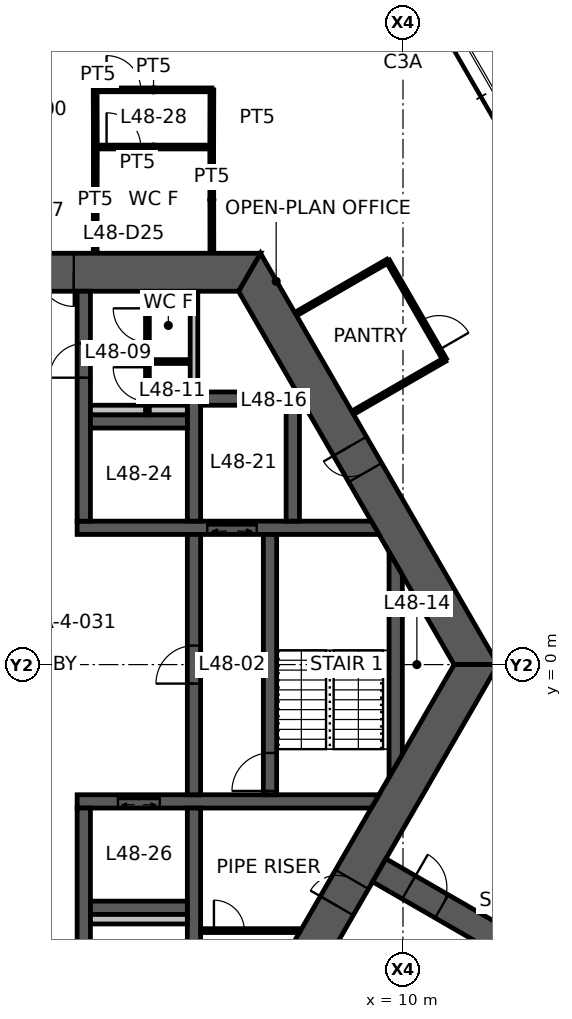
"""IFC4 building model, lengths in metres.
Left out: names, types, materials, properties, quantities, classifications, styles, units other than length and angle.
Written with IfcOpenShell. Run it as: python <this file> out.ifc"""

import sys

from ifc_helpers import new_model, si_unit, direction, frame, frame_2d, origin, place, context, subcontext, project, spatial, polyline, rectangle, outline, extrude, element, fill, save


model = new_model("IFC4")
c1 = context("Model", 3, precision=1e-05, world=origin(), true_north=direction((0.0, 1.0)))
c2 = subcontext(c1, "Body", "Model", "MODEL_VIEW")
j1 = project(units=[si_unit("LENGTHUNIT", "METRE"), si_unit("PLANEANGLEUNIT", "RADIAN")], contexts=[c1])
p1 = place(None, origin())
s1 = spatial("IfcSite", under=j1, at=p1, CompositionType="ELEMENT")
p2 = place(p1, origin())
s2 = spatial("IfcBuilding", under=s1, at=p2, CompositionType="ELEMENT")
p3 = place(p2, frame((0.0, 0.0, 191.6)))
s3 = spatial("IfcBuildingStorey", under=s2, at=p3, CompositionType="ELEMENT", Elevation=191.6)
p4 = place(p3, frame((11.922, 0.0, 0.0), z_axis=(0.0, 0.0, 1.0), x_axis=(-0.500004296715, 0.866022923061, 0.0)))
e1 = element("IfcWall", 1, at=p4, inside=s3, PredefinedType="SHEAR", context=c2, shape_type="SweptSolid", body=[
    extrude(outline(polyline([(-0.289, -0.5), (5.835, -0.5), (6.635, -0.5), (12.211, -0.5), (11.634, 0.5), (6.635, 0.5), (5.835, 0.5), (0.289, 0.5), (-0.289, -0.5)])), origin(), (0.0, 0.0, 1.0), 3.9),
])
p5 = place(p4, frame((5.835, 0.0, 0.0)))
e2 = element("IfcOpeningElement", 2, at=p5, cuts=e1, PredefinedType="OPENING", context=c2, shape_type="SweptSolid", body=[
    extrude(rectangle(XDim=0.8, YDim=2.1, at=frame_2d((0.4, 1.05))), frame((0.0, 0.51, 0.0), z_axis=(0.0, -1.0, 0.0), x_axis=(1.0, 0.0, 0.0)), (0.0, 0.0, 1.0), 1.02),
])
p6 = place(p3, frame((5.961, 10.325, 0.0), z_axis=(0.0, 0.0, 1.0), x_axis=(-1.0, 0.0, 0.0)))
e3 = element("IfcWall", 3, at=p6, inside=s3, PredefinedType="SHEAR", context=c2, shape_type="SweptSolid", body=[
    extrude(outline(polyline([(-0.289, -0.5), (4.624, -0.5), (5.523, -0.5), (6.399, -0.5), (7.299, -0.5), (12.211, -0.5), (11.634, 0.5), (7.299, 0.5), (6.399, 0.5), (5.523, 0.5), (4.624, 0.5), (0.289, 0.5), (-0.289, -0.5)])), origin(), (0.0, 0.0, 1.0), 3.9),
])
p7 = place(p6, frame((6.399, 0.0, 0.0)))
e4 = element("IfcOpeningElement", 4, at=p7, cuts=e3, PredefinedType="OPENING", context=c2, shape_type="SweptSolid", body=[
    extrude(rectangle(XDim=0.9, YDim=2.1, at=frame_2d((0.45, 1.05))), frame((0.0, 0.51, 0.0), z_axis=(0.0, -1.0, 0.0), x_axis=(1.0, 0.0, 0.0)), (0.0, 0.0, 1.0), 1.02),
])
p8 = place(p6, frame((4.624, 0.0, 0.0)))
e5 = element("IfcOpeningElement", 5, at=p8, cuts=e3, PredefinedType="OPENING", context=c2, shape_type="SweptSolid", body=[
    extrude(rectangle(XDim=0.9, YDim=2.1, at=frame_2d((0.45, 1.05))), frame((0.0, 0.51, 0.0), z_axis=(0.0, -1.0, 0.0), x_axis=(1.0, 0.0, 0.0)), (0.0, 0.0, 1.0), 1.02),
])
p9 = place(p3, frame((5.961, -10.325, 0.0), z_axis=(0.0, 0.0, 1.0), x_axis=(0.500004296715, 0.866022923061, 0.0)))
e6 = element("IfcWall", 6, at=p9, inside=s3, PredefinedType="SHEAR", context=c2, shape_type="SweptSolid", body=[
    extrude(outline(polyline([(-0.289, -0.5), (4.594, -0.5), (5.394, -0.5), (12.211, -0.5), (11.634, 0.5), (5.394, 0.5), (4.594, 0.5), (0.289, 0.5), (-0.289, -0.5)])), origin(), (0.0, 0.0, 1.0), 3.9),
])
p10 = place(p9, frame((4.594, 0.0, 0.0)))
e7 = element("IfcOpeningElement", 7, at=p10, cuts=e6, PredefinedType="OPENING", context=c2, shape_type="SweptSolid", body=[
    extrude(rectangle(XDim=0.8, YDim=2.1, at=frame_2d((0.4, 1.05))), frame((0.0, 0.51, 0.0), z_axis=(0.0, -1.0, 0.0), x_axis=(1.0, 0.0, 0.0)), (0.0, 0.0, 1.0), 1.02),
])
p11 = place(p3, frame((9.375, -5.413, 0.0), z_axis=(0.0, 0.0, 1.0), x_axis=(0.866032377459, -0.499987921047, 0.0)))
e8 = element("IfcWall", 8, at=p11, inside=s3, PredefinedType="SHEAR", context=c2, shape_type="SweptSolid", body=[
    extrude(rectangle(XDim=7.696, YDim=0.7, at=frame_2d((3.848, 0.0))), origin(), (0.0, 0.0, 1.0), 3.9),
])
p12 = place(p11, frame((0.9, 0.0, 0.0)))
e9 = element("IfcOpeningElement", 9, at=p12, cuts=e8, PredefinedType="OPENING", context=c2, shape_type="SweptSolid", body=[
    extrude(rectangle(XDim=1.0, YDim=2.1, at=frame_2d((0.5, 1.05))), frame((0.0, 0.36, 0.0), z_axis=(0.0, -1.0, 0.0), x_axis=(1.0, 0.0, 0.0)), (0.0, 0.0, 1.0), 0.72),
])
p13 = place(p3, frame((1.425, 3.6, 0.0), z_axis=(0.0, 0.0, 1.0), x_axis=(1.0, 0.0, 0.0)))
e10 = element("IfcWall", 10, at=p13, inside=s3, PredefinedType="SHEAR", context=c2, shape_type="SweptSolid", body=[
    extrude(outline(polyline([(0.0, -0.175), (3.425, -0.175), (4.725, -0.175), (7.942, -0.175), (7.74, 0.175), (4.725, 0.175), (3.425, 0.175), (0.0, 0.175), (0.0, -0.175)])), origin(), (0.0, 0.0, 1.0), 3.9),
])
p14 = place(p13, frame((3.425, 0.0, 0.0)))
e11 = element("IfcOpeningElement", 11, at=p14, cuts=e10, PredefinedType="OPENING", context=c2, shape_type="SweptSolid", body=[
    extrude(rectangle(XDim=1.3, YDim=2.1, at=frame_2d((0.65, 1.05))), frame((0.0, 0.185, 0.0), z_axis=(0.0, -1.0, 0.0), x_axis=(1.0, 0.0, 0.0)), (0.0, 0.0, 1.0), 0.37),
])
p15 = place(p3, frame((1.425, -3.6, 0.0), z_axis=(0.0, 0.0, 1.0), x_axis=(1.0, 0.0, 0.0)))
e12 = element("IfcWall", 12, at=p15, inside=s3, PredefinedType="SHEAR", context=c2, shape_type="SweptSolid", body=[
    extrude(outline(polyline([(0.0, -0.175), (1.075, -0.175), (2.175, -0.175), (7.74, -0.175), (7.942, 0.175), (2.175, 0.175), (1.075, 0.175), (0.0, 0.175), (0.0, -0.175)])), origin(), (0.0, 0.0, 1.0), 3.9),
])
p16 = place(p15, frame((1.075, 0.0, 0.0)))
e13 = element("IfcOpeningElement", 13, at=p16, cuts=e12, PredefinedType="OPENING", context=c2, shape_type="SweptSolid", body=[
    extrude(rectangle(XDim=1.1, YDim=2.1, at=frame_2d((0.55, 1.05))), frame((0.0, 0.185, 0.0), z_axis=(0.0, -1.0, 0.0), x_axis=(1.0, 0.0, 0.0)), (0.0, 0.0, 1.0), 0.37),
])
p17 = place(p3, frame((1.6, 3.775, 0.0), z_axis=(0.0, 0.0, 1.0), x_axis=(0.0, 1.0, 0.0)))
e14 = element("IfcWall", 14, at=p17, inside=s3, PredefinedType="SHEAR", context=c2, shape_type="SweptSolid", body=[
    extrude(rectangle(XDim=6.05, YDim=0.35, at=frame_2d((3.025, 0.0))), origin(), (0.0, 0.0, 1.0), 3.9),
])
p18 = place(p17, frame((3.775, 0.0, 0.0)))
e15 = element("IfcOpeningElement", 15, at=p18, cuts=e14, PredefinedType="OPENING", context=c2, shape_type="SweptSolid", body=[
    extrude(rectangle(XDim=0.9, YDim=2.1, at=frame_2d((0.45, 1.05))), frame((0.0, 0.185, 0.0), z_axis=(0.0, -1.0, 0.0), x_axis=(1.0, 0.0, 0.0)), (0.0, 0.0, 1.0), 0.37),
])
p19 = place(p3, frame((1.6, -3.775, 0.0), z_axis=(0.0, 0.0, 1.0), x_axis=(0.0, -1.0, 0.0)))
e16 = element("IfcWall", 16, at=p19, inside=s3, PredefinedType="SHEAR", context=c2, shape_type="SweptSolid", body=[
    extrude(rectangle(XDim=6.05, YDim=0.35, at=frame_2d((3.025, 0.0))), origin(), (0.0, 0.0, 1.0), 3.9),
])
p20 = place(p19, frame((3.625, 0.0, 0.0)))
e17 = element("IfcOpeningElement", 17, at=p20, cuts=e16, PredefinedType="OPENING", context=c2, shape_type="SweptSolid", body=[
    extrude(rectangle(XDim=1.2, YDim=2.1, at=frame_2d((0.6, 1.05))), frame((0.0, 0.185, 0.0), z_axis=(0.0, -1.0, 0.0), x_axis=(1.0, 0.0, 0.0)), (0.0, 0.0, 1.0), 0.37),
])
p21 = place(p3, frame((4.5, -3.425, 0.0), z_axis=(0.0, 0.0, 1.0), x_axis=(0.0, 1.0, 0.0)))
e18 = element("IfcWall", 18, at=p21, inside=s3, PredefinedType="SHEAR", context=c2, shape_type="SweptSolid", body=[
    extrude(rectangle(XDim=6.85, YDim=0.35, at=frame_2d((3.425, 0.0))), origin(), (0.0, 0.0, 1.0), 3.9),
])
p22 = place(p21, frame((2.925, 0.0, 0.0)))
e19 = element("IfcOpeningElement", 19, at=p22, cuts=e18, PredefinedType="OPENING", context=c2, shape_type="SweptSolid", body=[
    extrude(rectangle(XDim=1.0, YDim=2.1, at=frame_2d((0.5, 1.05))), frame((0.0, 0.185, 0.0), z_axis=(0.0, -1.0, 0.0), x_axis=(1.0, 0.0, 0.0)), (0.0, 0.0, 1.0), 0.37),
])
p23 = place(p3, frame((6.5, -3.425, 0.0), z_axis=(0.0, 0.0, 1.0), x_axis=(0.0, 1.0, 0.0)))
e20 = element("IfcWall", 20, at=p23, inside=s3, PredefinedType="SHEAR", context=c2, shape_type="SweptSolid", body=[
    extrude(rectangle(XDim=6.85, YDim=0.35, at=frame_2d((3.425, 0.0))), origin(), (0.0, 0.0, 1.0), 3.9),
])
p24 = place(p23, frame((0.1, 0.0, 0.0)))
e21 = element("IfcOpeningElement", 21, at=p24, cuts=e20, PredefinedType="OPENING", context=c2, shape_type="SweptSolid", body=[
    extrude(rectangle(XDim=1.0, YDim=2.1, at=frame_2d((0.5, 1.05))), frame((0.0, 0.185, 0.0), z_axis=(0.0, -1.0, 0.0), x_axis=(1.0, 0.0, 0.0)), (0.0, 0.0, 1.0), 0.37),
])
p25 = place(p3, frame((4.5, 3.775, 0.0), z_axis=(0.0, 0.0, 1.0), x_axis=(0.0, 1.0, 0.0)))
e22 = element("IfcWall", 22, at=p25, inside=s3, PredefinedType="SHEAR", context=c2, shape_type="SweptSolid", body=[
    extrude(rectangle(XDim=3.4, YDim=0.35, at=frame_2d((1.7, 0.0))), origin(), (0.0, 0.0, 1.0), 3.9),
])
p26 = place(p3, frame((4.5, -3.775, 0.0), z_axis=(0.0, 0.0, 1.0), x_axis=(0.0, -1.0, 0.0)))
e23 = element("IfcWall", 23, at=p26, inside=s3, PredefinedType="SHEAR", context=c2, shape_type="SweptSolid", body=[
    extrude(rectangle(XDim=6.05, YDim=0.35, at=frame_2d((3.025, 0.0))), origin(), (0.0, 0.0, 1.0), 3.9),
])
for number, where, z_axis, x_axis in (
    (24, (1.775, 6.4, 0.0), (0.0, 0.0, 1.0), (1.0, 0.0, 0.0)),
    (25, (1.775, -6.4, 0.0), (0.0, 0.0, 1.0), (1.0, 0.0, 0.0)),
):
    element("IfcWall", number, at=place(p3, frame(where, z_axis=z_axis, x_axis=x_axis)), inside=s3, PredefinedType="SHEAR", context=c2, shape_type="SweptSolid", body=[
        extrude(rectangle(XDim=2.55, YDim=0.35, at=frame_2d((1.275, 0.0))), origin(), (0.0, 0.0, 1.0), 3.9),
    ])
p27 = place(p3, frame((4.675, 7.0, 0.0), z_axis=(0.0, 0.0, 1.0), x_axis=(1.0, 0.0, 0.0)))
e26 = element("IfcWall", 26, at=p27, inside=s3, PredefinedType="SHEAR", context=c2, shape_type="SweptSolid", body=[
    extrude(rectangle(XDim=2.25, YDim=0.35, at=frame_2d((1.125, 0.0))), origin(), (0.0, 0.0, 1.0), 3.9),
])
p28 = place(p3, frame((7.1, 3.775, 0.0), z_axis=(0.0, 0.0, 1.0), x_axis=(0.0, 1.0, 0.0)))
e27 = element("IfcWall", 27, at=p28, inside=s3, PredefinedType="SHEAR", context=c2, shape_type="SweptSolid", body=[
    extrude(outline(polyline([(0.0, -0.175), (3.274, -0.175), (3.4, 0.0), (3.4, 0.175), (0.0, 0.175), (0.0, -0.175)])), origin(), (0.0, 0.0, 1.0), 3.9),
])
p29 = place(p3, frame((9.808, -2.662, 0.0), z_axis=(0.0, 0.0, 1.0), x_axis=(0.0, 1.0, 0.0)))
e28 = element("IfcWall", 28, at=p29, inside=s3, PredefinedType="SHEAR", context=c2, shape_type="SweptSolid", body=[
    extrude(outline(polyline([(0.303, -0.175), (5.021, -0.175), (5.628, 0.175), (-0.303, 0.175), (0.303, -0.175)])), origin(), (0.0, 0.0, 1.0), 3.9),
])
p30 = place(p3, frame((4.5, 7.175, 0.0), z_axis=(0.0, 0.0, 1.0), x_axis=(0.0, 1.0, 0.0)))
e29 = element("IfcWall", 29, at=p30, inside=s3, PredefinedType="STANDARD", context=c2, shape_type="SweptSolid", body=[
    extrude(rectangle(XDim=2.65, YDim=0.2, at=frame_2d((1.325, 0.0))), origin(), (0.0, 0.0, 1.0), 3.9),
])
for number, where, z_axis, x_axis in (
    (30, (1.775, 6.7, 0.0), (0.0, 0.0, 1.0), (1.0, 0.0, 0.0)),
    (31, (1.775, -6.7, 0.0), (0.0, 0.0, 1.0), (1.0, 0.0, 0.0)),
):
    element("IfcWall", number, at=place(p3, frame(where, z_axis=z_axis, x_axis=x_axis)), inside=s3, PredefinedType="PLUMBINGWALL", context=c2, shape_type="SweptSolid", body=[
        extrude(rectangle(XDim=2.55, YDim=0.25, at=frame_2d((1.275, 0.0))), origin(), (0.0, 0.0, 1.0), 3.9),
    ])
p31 = place(p3, frame((3.275, 6.575, 0.0), z_axis=(0.0, 0.0, 1.0), x_axis=(0.0, 1.0, 0.0)))
e32 = element("IfcWall", 32, at=p31, inside=s3, PredefinedType="PARTITIONING", context=c2, shape_type="SweptSolid", body=[
    extrude(rectangle(XDim=3.25, YDim=0.1, at=frame_2d((1.625, 0.0))), origin(), (0.0, 0.0, 1.0), 2.95),
])
p32 = place(p31, frame((1.9, 0.0, 0.0)))
e33 = element("IfcOpeningElement", 33, at=p32, cuts=e32, PredefinedType="OPENING", context=c2, shape_type="SweptSolid", body=[
    extrude(rectangle(XDim=0.9, YDim=2.1, at=frame_2d((0.45, 1.05))), frame((0.0, 0.06, 0.0), z_axis=(0.0, -1.0, 0.0), x_axis=(1.0, 0.0, 0.0)), (0.0, 0.0, 1.0), 0.12),
])
p33 = place(p31, frame((0.35, 0.0, 0.0)))
e34 = element("IfcOpeningElement", 34, at=p33, cuts=e32, PredefinedType="OPENING", context=c2, shape_type="SweptSolid", body=[
    extrude(rectangle(XDim=0.9, YDim=2.1, at=frame_2d((0.45, 1.05))), frame((0.0, 0.06, 0.0), z_axis=(0.0, -1.0, 0.0), x_axis=(1.0, 0.0, 0.0)), (0.0, 0.0, 1.0), 0.12),
])
p34 = place(p3, frame((3.325, 7.975, 0.0), z_axis=(0.0, 0.0, 1.0), x_axis=(1.0, 0.0, 0.0)))
e35 = element("IfcWall", 35, at=p34, inside=s3, PredefinedType="PARTITIONING", context=c2, shape_type="SweptSolid", body=[
    extrude(rectangle(XDim=1.0, YDim=0.1, at=frame_2d((0.5, 0.0))), origin(), (0.0, 0.0, 1.0), 2.95),
])
p35 = place(p3, frame((4.675, -7.0, 0.0), z_axis=(0.0, 0.0, 1.0), x_axis=(1.0, 0.0, 0.0)))
e36 = element("IfcWall", 36, at=p35, inside=s3, PredefinedType="PARTITIONING", context=c2, shape_type="SweptSolid", body=[
    extrude(outline(polyline([(0.0, -0.05), (0.35, -0.05), (1.15, -0.05), (2.6, -0.05), (2.628, 0.0), (2.634, 0.05), (1.15, 0.05), (0.35, 0.05), (0.0, 0.05), (0.0, -0.05)])), origin(), (0.0, 0.0, 1.0), 2.95),
])
p36 = place(p35, frame((0.35, 0.0, 0.0)))
e37 = element("IfcOpeningElement", 37, at=p36, cuts=e36, PredefinedType="OPENING", context=c2, shape_type="SweptSolid", body=[
    extrude(rectangle(XDim=0.8, YDim=2.1, at=frame_2d((0.4, 1.05))), frame((0.0, 0.06, 0.0), z_axis=(0.0, -1.0, 0.0), x_axis=(1.0, 0.0, 0.0)), (0.0, 0.0, 1.0), 0.12),
])
p37 = place(p3, frame((1.9, 13.62, 0.0), z_axis=(0.0, 0.0, 1.0), x_axis=(1.0, 0.0, 0.0)))
e38 = element("IfcWall", 38, at=p37, inside=s3, PredefinedType="PARTITIONING", context=c2, shape_type="SweptSolid", body=[
    extrude(rectangle(XDim=3.071, YDim=0.1, at=frame_2d((1.536, 0.0))), origin(), (0.0, 0.0, 1.0), 2.95),
])
p38 = place(p37, frame((0.3, 0.0, 0.0)))
e39 = element("IfcOpeningElement", 39, at=p38, cuts=e38, PredefinedType="OPENING", context=c2, shape_type="SweptSolid", body=[
    extrude(rectangle(XDim=0.9, YDim=2.1, at=frame_2d((0.45, 1.05))), frame((0.0, 0.06, 0.0), z_axis=(0.0, -1.0, 0.0), x_axis=(1.0, 0.0, 0.0)), (0.0, 0.0, 1.0), 0.12),
])
for number, where, z_axis, x_axis in (
    (40, (1.9, 10.845, 0.0), (0.0, 0.0, 1.0), (0.002, 1.0, 0.0)),
    (41, (4.966, 13.625, 0.0), (0.0, 0.0, 1.0), (0.002, -1.0, 0.0)),
):
    element("IfcWall", number, at=place(p3, frame(where, z_axis=z_axis, x_axis=x_axis)), inside=s3, PredefinedType="PARTITIONING", context=c2, shape_type="SweptSolid", body=[
        extrude(rectangle(XDim=2.78, YDim=0.1, at=frame_2d((1.39, 0.0))), origin(), (0.0, 0.0, 1.0), 2.95),
    ])
p39 = place(p3, frame((1.9, 15.125, 0.0), z_axis=(0.0, 0.0, 1.0), x_axis=(1.0, 0.0, 0.0)))
e42 = element("IfcWall", 42, at=p39, inside=s3, PredefinedType="PARTITIONING", context=c2, shape_type="SweptSolid", body=[
    extrude(rectangle(XDim=3.071, YDim=0.1, at=frame_2d((1.536, 0.0))), origin(), (0.0, 0.0, 1.0), 2.95),
])
p40 = place(p39, frame((0.3, 0.0, 0.0)))
e43 = element("IfcOpeningElement", 43, at=p40, cuts=e42, PredefinedType="OPENING", context=c2, shape_type="SweptSolid", body=[
    extrude(rectangle(XDim=0.9, YDim=2.1, at=frame_2d((0.45, 1.05))), frame((0.0, 0.06, 0.0), z_axis=(0.0, -1.0, 0.0), x_axis=(1.0, 0.0, 0.0)), (0.0, 0.0, 1.0), 0.12),
])
for number, where, z_axis, x_axis in (
    (44, (1.905, 13.625, 0.0), (0.0, 0.0, 1.0), (-0.003, 1.0, 0.0)),
    (45, (4.971, 15.125, 0.0), (0.0, 0.0, 1.0), (-0.003, -1.0, 0.0)),
):
    element("IfcWall", number, at=place(p3, frame(where, z_axis=z_axis, x_axis=x_axis)), inside=s3, PredefinedType="PARTITIONING", context=c2, shape_type="SweptSolid", body=[
        extrude(rectangle(XDim=1.5, YDim=0.1, at=frame_2d((0.75, 0.0))), origin(), (0.0, 0.0, 1.0), 2.95),
    ])
p41 = place(p3, frame((7.192, 9.233, 0.0), z_axis=(0.0, 0.0, 1.0), x_axis=(0.866018876994, 0.500011304563, 0.0)))
e46 = element("IfcWall", 46, at=p41, inside=s3, PredefinedType="PARTITIONING", context=c2, shape_type="SweptSolid", body=[
    extrude(rectangle(XDim=2.78, YDim=0.1, at=frame_2d((1.39, 0.0))), origin(), (0.0, 0.0, 1.0), 2.95),
])
p42 = place(p3, frame((9.6, 10.623, 0.0), z_axis=(0.0, 0.0, 1.0), x_axis=(0.499990139034, -0.866031096941, 0.0)))
e47 = element("IfcWall", 47, at=p42, inside=s3, PredefinedType="PARTITIONING", context=c2, shape_type="SweptSolid", body=[
    extrude(rectangle(XDim=3.0, YDim=0.1, at=frame_2d((1.5, 0.0))), origin(), (0.0, 0.0, 1.0), 2.95),
])
p43 = place(p42, frame((1.8, 0.0, 0.0)))
e48 = element("IfcOpeningElement", 48, at=p43, cuts=e47, PredefinedType="OPENING", context=c2, shape_type="SweptSolid", body=[
    extrude(rectangle(XDim=0.9, YDim=2.1, at=frame_2d((0.45, 1.05))), frame((0.0, 0.06, 0.0), z_axis=(0.0, -1.0, 0.0), x_axis=(1.0, 0.0, 0.0)), (0.0, 0.0, 1.0), 0.12),
])
p44 = place(p3, frame((11.1, 8.025, 0.0), z_axis=(0.0, 0.0, 1.0), x_axis=(-0.866056901187, -0.49994544093, 0.0)))
e49 = element("IfcWall", 49, at=p44, inside=s3, PredefinedType="PARTITIONING", context=c2, shape_type="SweptSolid", body=[
    extrude(rectangle(XDim=2.78, YDim=0.1, at=frame_2d((1.39, 0.0))), origin(), (0.0, 0.0, 1.0), 2.95),
])
p45 = place(p8, origin())
e50 = element("IfcDoor", 50, at=p45, inside=s3, OperationType="SINGLE_SWING_LEFT", PredefinedType="DOOR", context=c2, shape_type="SweptSolid", body=[
    extrude(rectangle(XDim=0.9, YDim=2.1, at=frame_2d((0.45, 1.05))), frame((0.0, 0.025, 0.0), z_axis=(0.0, -1.0, 0.0), x_axis=(1.0, 0.0, 0.0)), (0.0, 0.0, 1.0), 0.05),
])
fill(e5, e50)
p46 = place(p5, origin())
e51 = element("IfcDoor", 51, at=p46, inside=s3, OperationType="SINGLE_SWING_RIGHT", PredefinedType="DOOR", context=c2, shape_type="SweptSolid", body=[
    extrude(rectangle(XDim=0.8, YDim=2.1, at=frame_2d((0.4, 1.05))), frame((0.0, 0.025, 0.0), z_axis=(0.0, -1.0, 0.0), x_axis=(1.0, 0.0, 0.0)), (0.0, 0.0, 1.0), 0.05),
])
fill(e2, e51)
p47 = place(p10, origin())
e52 = element("IfcDoor", 52, at=p47, inside=s3, OperationType="SINGLE_SWING_LEFT", PredefinedType="DOOR", context=c2, shape_type="SweptSolid", body=[
    extrude(rectangle(XDim=0.8, YDim=2.1, at=frame_2d((0.4, 1.05))), frame((0.0, 0.025, 0.0), z_axis=(0.0, -1.0, 0.0), x_axis=(1.0, 0.0, 0.0)), (0.0, 0.0, 1.0), 0.05),
])
fill(e7, e52)
p48 = place(p22, origin())
e53 = element("IfcDoor", 53, at=p48, inside=s3, OperationType="SINGLE_SWING_LEFT", PredefinedType="DOOR", context=c2, shape_type="SweptSolid", body=[
    extrude(rectangle(XDim=1.0, YDim=2.1, at=frame_2d((0.5, 1.05))), frame((0.0, 0.025, 0.0), z_axis=(0.0, -1.0, 0.0), x_axis=(1.0, 0.0, 0.0)), (0.0, 0.0, 1.0), 0.05),
])
fill(e19, e53)
p49 = place(p24, origin())
e54 = element("IfcDoor", 54, at=p49, inside=s3, OperationType="SINGLE_SWING_LEFT", PredefinedType="DOOR", context=c2, shape_type="SweptSolid", body=[
    extrude(rectangle(XDim=1.0, YDim=2.1, at=frame_2d((0.5, 1.05))), frame((0.0, 0.025, 0.0), z_axis=(0.0, -1.0, 0.0), x_axis=(1.0, 0.0, 0.0)), (0.0, 0.0, 1.0), 0.05),
])
fill(e21, e54)
p50 = place(p18, origin())
e55 = element("IfcDoor", 55, at=p50, inside=s3, OperationType="SINGLE_SWING_LEFT", PredefinedType="DOOR", context=c2, shape_type="SweptSolid", body=[
    extrude(rectangle(XDim=0.9, YDim=2.1, at=frame_2d((0.45, 1.05))), frame((0.0, 0.025, 0.0), z_axis=(0.0, -1.0, 0.0), x_axis=(1.0, 0.0, 0.0)), (0.0, 0.0, 1.0), 0.05),
])
fill(e15, e55)
p51 = place(p12, origin())
e56 = element("IfcDoor", 56, at=p51, inside=s3, OperationType="SINGLE_SWING_LEFT", PredefinedType="DOOR", context=c2, shape_type="SweptSolid", body=[
    extrude(rectangle(XDim=1.0, YDim=2.1, at=frame_2d((0.5, 1.05))), frame((0.0, 0.025, 0.0), z_axis=(0.0, -1.0, 0.0), x_axis=(1.0, 0.0, 0.0)), (0.0, 0.0, 1.0), 0.05),
])
fill(e9, e56)
p52 = place(p32, origin())
e57 = element("IfcDoor", 57, at=p52, inside=s3, OperationType="SINGLE_SWING_RIGHT", PredefinedType="DOOR", context=c2, shape_type="SweptSolid", body=[
    extrude(rectangle(XDim=0.9, YDim=2.1, at=frame_2d((0.45, 1.05))), frame((0.0, 0.025, 0.0), z_axis=(0.0, -1.0, 0.0), x_axis=(1.0, 0.0, 0.0)), (0.0, 0.0, 1.0), 0.05),
])
fill(e33, e57)
p53 = place(p33, origin())
e58 = element("IfcDoor", 58, at=p53, inside=s3, OperationType="SINGLE_SWING_RIGHT", PredefinedType="DOOR", context=c2, shape_type="SweptSolid", body=[
    extrude(rectangle(XDim=0.9, YDim=2.1, at=frame_2d((0.45, 1.05))), frame((0.0, 0.025, 0.0), z_axis=(0.0, -1.0, 0.0), x_axis=(1.0, 0.0, 0.0)), (0.0, 0.0, 1.0), 0.05),
])
fill(e34, e58)
p54 = place(p36, origin())
e59 = element("IfcDoor", 59, at=p54, inside=s3, OperationType="SINGLE_SWING_LEFT", PredefinedType="DOOR", context=c2, shape_type="SweptSolid", body=[
    extrude(rectangle(XDim=0.8, YDim=2.1, at=frame_2d((0.4, 1.05))), frame((0.0, 0.025, 0.0), z_axis=(0.0, -1.0, 0.0), x_axis=(1.0, 0.0, 0.0)), (0.0, 0.0, 1.0), 0.05),
])
fill(e37, e59)
p55 = place(p38, origin())
e60 = element("IfcDoor", 60, at=p55, inside=s3, OperationType="SINGLE_SWING_LEFT", PredefinedType="DOOR", context=c2, shape_type="SweptSolid", body=[
    extrude(rectangle(XDim=0.9, YDim=2.1, at=frame_2d((0.45, 1.05))), frame((0.0, 0.025, 0.0), z_axis=(0.0, -1.0, 0.0), x_axis=(1.0, 0.0, 0.0)), (0.0, 0.0, 1.0), 0.05),
])
fill(e39, e60)
p56 = place(p40, origin())
e61 = element("IfcDoor", 61, at=p56, inside=s3, OperationType="SINGLE_SWING_LEFT", PredefinedType="DOOR", context=c2, shape_type="SweptSolid", body=[
    extrude(rectangle(XDim=0.9, YDim=2.1, at=frame_2d((0.45, 1.05))), frame((0.0, 0.025, 0.0), z_axis=(0.0, -1.0, 0.0), x_axis=(1.0, 0.0, 0.0)), (0.0, 0.0, 1.0), 0.05),
])
fill(e43, e61)
p57 = place(p43, origin())
e62 = element("IfcDoor", 62, at=p57, inside=s3, OperationType="SINGLE_SWING_RIGHT", PredefinedType="DOOR", context=c2, shape_type="SweptSolid", body=[
    extrude(rectangle(XDim=0.9, YDim=2.1, at=frame_2d((0.45, 1.05))), frame((0.0, 0.025, 0.0), z_axis=(0.0, -1.0, 0.0), x_axis=(1.0, 0.0, 0.0)), (0.0, 0.0, 1.0), 0.05),
])
fill(e48, e62)
p58 = place(p16, origin())
e63 = element("IfcDoor", 63, at=p58, inside=s3, OperationType="DOUBLE_DOOR_SLIDING", PredefinedType="DOOR", context=c2, shape_type="SweptSolid", body=[
    extrude(rectangle(XDim=1.1, YDim=2.1, at=frame_2d((0.55, 1.05))), frame((0.0, 0.025, 0.0), z_axis=(0.0, -1.0, 0.0), x_axis=(1.0, 0.0, 0.0)), (0.0, 0.0, 1.0), 0.05),
])
fill(e13, e63)
p59 = place(p14, origin())
e64 = element("IfcDoor", 64, at=p59, inside=s3, OperationType="DOUBLE_DOOR_SLIDING", PredefinedType="DOOR", context=c2, shape_type="SweptSolid", body=[
    extrude(rectangle(XDim=1.3, YDim=2.1, at=frame_2d((0.65, 1.05))), frame((0.0, 0.025, 0.0), z_axis=(0.0, -1.0, 0.0), x_axis=(1.0, 0.0, 0.0)), (0.0, 0.0, 1.0), 0.05),
])
fill(e11, e64)
save(model, sys.argv[1])
